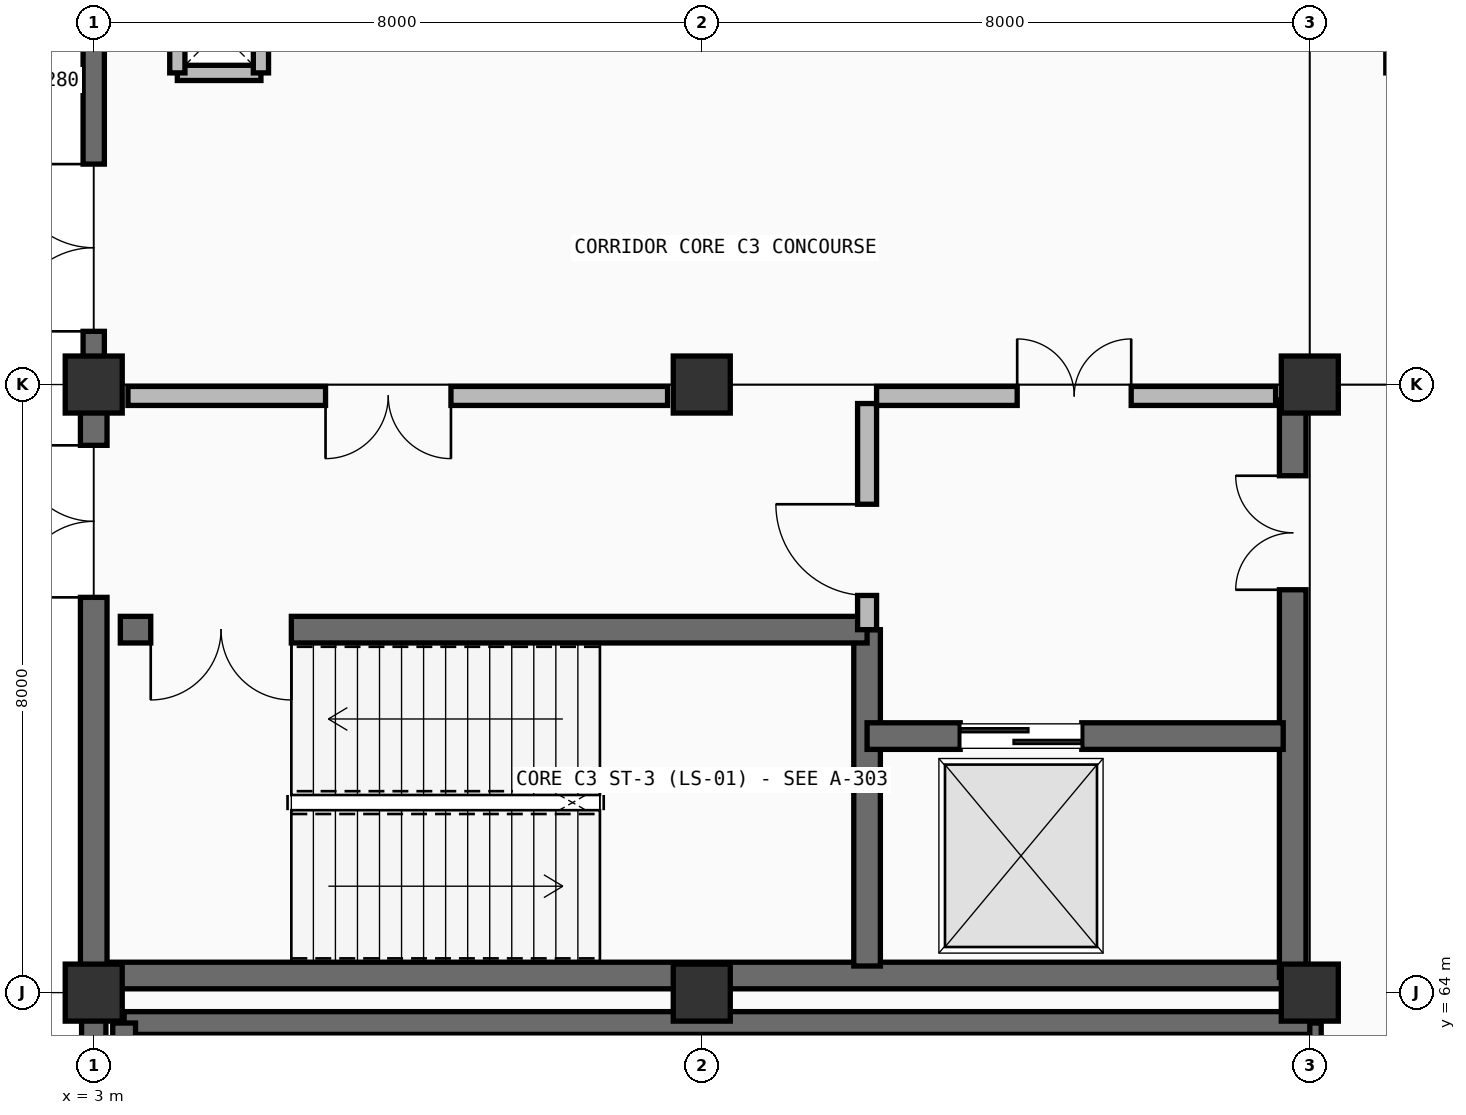
"""IFC4 building model, lengths in metres.
Left out: names, types, materials, properties, quantities, classifications, styles, units other than length and angle.
Written with IfcOpenShell. Run it as: python <this file> out.ifc"""

import sys

from ifc_helpers import new_model, si_unit, direction, frame, frame_2d, origin, origin_2d, place, context, subcontext, project, spatial, rectangle, extrude, element, fill, save


model = new_model("IFC4")
c1 = context("Model", 3, precision=1e-05, world=origin(), true_north=direction((0.0, 1.0)))
c2 = subcontext(c1, "Body", "Model", "MODEL_VIEW")
j1 = project(units=[si_unit("LENGTHUNIT", "METRE"), si_unit("PLANEANGLEUNIT", "RADIAN")], contexts=[c1])
p1 = place(None, origin())
s1 = spatial("IfcSite", under=j1, at=p1, CompositionType="ELEMENT")
p2 = place(p1, origin())
s2 = spatial("IfcBuilding", under=s1, at=p2, CompositionType="ELEMENT")
p3 = place(p2, origin())
s3 = spatial("IfcBuildingStorey", under=s2, at=p3, CompositionType="ELEMENT", Elevation=0.0)
for number, where, z_axis, x_axis in (
    (1, (3.0, 64.0, 0.0), (0.0, 0.0, 1.0), (1.0, 0.0, 0.0)),
    (2, (3.0, 72.0, 0.0), (0.0, 0.0, 1.0), (1.0, 0.0, 0.0)),
    (3, (11.0, 64.0, 0.0), (0.0, 0.0, 1.0), (1.0, 0.0, 0.0)),
    (4, (11.0, 72.0, 0.0), (0.0, 0.0, 1.0), (1.0, 0.0, 0.0)),
    (5, (19.0, 64.0, 0.0), (0.0, 0.0, 1.0), (1.0, 0.0, 0.0)),
    (6, (19.0, 72.0, 0.0), (0.0, 0.0, 1.0), (1.0, 0.0, 0.0)),
):
    element("IfcColumn", number, at=place(p3, frame(where, z_axis=z_axis, x_axis=x_axis)), inside=s3, PredefinedType="COLUMN", context=c2, shape_type="SweptSolid", body=[
        extrude(rectangle(XDim=0.75, YDim=0.75, at=origin_2d()), origin(), (0.0, 0.0, 1.0), 5.4),
    ])
p4 = place(p3, frame((3.0, 59.0, 0.0), z_axis=(0.0, 0.0, 1.0), x_axis=(0.0, 1.0, 0.0)))
e7 = element("IfcWall", 7, at=p4, inside=s3, PredefinedType="SOLIDWALL", context=c2, shape_type="SweptSolid", body=[
    extrude(rectangle(XDim=5.0, YDim=0.32, at=frame_2d((2.5, 0.0))), origin(), (0.0, 0.0, 1.0), 5.4),
])
p5 = place(p3, frame((3.0, 64.0, 0.0), z_axis=(0.0, 0.0, 1.0), x_axis=(0.0, 1.0, 0.0)))
e8 = element("IfcWall", 8, at=p5, inside=s3, PredefinedType="SHEAR", context=c2, shape_type="SweptSolid", body=[
    extrude(rectangle(XDim=8.0, YDim=0.35, at=frame_2d((4.0, 0.0))), origin(), (0.0, 0.0, 1.0), 5.4),
])
p6 = place(p5, frame((5.2, 0.0, 0.0)))
e9 = element("IfcOpeningElement", 9, at=p6, cuts=e8, PredefinedType="OPENING", context=c2, shape_type="SweptSolid", body=[
    extrude(rectangle(XDim=2.0, YDim=2.6, at=frame_2d((1.0, 1.3))), frame((0.0, 0.185, 0.0), z_axis=(0.0, -1.0, 0.0), x_axis=(1.0, 0.0, 0.0)), (0.0, 0.0, 1.0), 0.37),
])
p7 = place(p3, frame((3.0, 72.0, 0.0), z_axis=(0.0, 0.0, 1.0), x_axis=(0.0, 1.0, 0.0)))
e10 = element("IfcWall", 10, at=p7, inside=s3, PredefinedType="SOLIDWALL", context=c2, shape_type="SweptSolid", body=[
    extrude(rectangle(XDim=8.0, YDim=0.28, at=frame_2d((4.0, 0.0))), origin(), (0.0, 0.0, 1.0), 5.4),
])
p8 = place(p7, frame((0.7, 0.0, 0.0)))
e11 = element("IfcOpeningElement", 11, at=p8, cuts=e10, PredefinedType="OPENING", context=c2, shape_type="SweptSolid", body=[
    extrude(rectangle(XDim=2.2, YDim=2.8, at=frame_2d((1.1, 1.4))), frame((0.0, 0.15, 0.0), z_axis=(0.0, -1.0, 0.0), x_axis=(1.0, 0.0, 0.0)), (0.0, 0.0, 1.0), 0.3),
])
p9 = place(p3, frame((3.2, 64.225, 0.0), z_axis=(0.0, 0.0, 1.0), x_axis=(1.0, 0.0, 0.0)))
e12 = element("IfcWall", 12, at=p9, inside=s3, PredefinedType="SHEAR", context=c2, shape_type="SweptSolid", body=[
    extrude(rectangle(XDim=15.6, YDim=0.35, at=frame_2d((7.8, 0.0))), origin(), (0.0, 0.0, 1.0), 5.1),
])
p10 = place(p3, frame((13.175, 64.35, 0.0), z_axis=(0.0, 0.0, 1.0), x_axis=(0.0, 1.0, 0.0)))
e13 = element("IfcWall", 13, at=p10, inside=s3, PredefinedType="SHEAR", context=c2, shape_type="SweptSolid", body=[
    extrude(rectangle(XDim=4.425, YDim=0.35, at=frame_2d((2.212, 0.0))), origin(), (0.0, 0.0, 1.0), 5.1),
])
p11 = place(p3, frame((18.775, 64.2, 0.0), z_axis=(0.0, 0.0, 1.0), x_axis=(0.0, 1.0, 0.0)))
e14 = element("IfcWall", 14, at=p11, inside=s3, PredefinedType="SHEAR", context=c2, shape_type="SweptSolid", body=[
    extrude(rectangle(XDim=7.6, YDim=0.35, at=frame_2d((3.8, 0.0))), origin(), (0.0, 0.0, 1.0), 5.1),
])
p12 = place(p11, frame((5.1, 0.0, 0.0)))
e15 = element("IfcOpeningElement", 15, at=p12, cuts=e14, PredefinedType="OPENING", context=c2, shape_type="SweptSolid", body=[
    extrude(rectangle(XDim=1.5, YDim=2.2, at=frame_2d((0.75, 1.1))), frame((0.0, 0.185, 0.0), z_axis=(0.0, -1.0, 0.0), x_axis=(1.0, 0.0, 0.0)), (0.0, 0.0, 1.0), 0.37),
])
p13 = place(p3, frame((3.35, 68.775, 0.0), z_axis=(0.0, 0.0, 1.0), x_axis=(1.0, 0.0, 0.0)))
e16 = element("IfcWall", 16, at=p13, inside=s3, PredefinedType="SHEAR", context=c2, shape_type="SweptSolid", body=[
    extrude(rectangle(XDim=9.825, YDim=0.35, at=frame_2d((4.913, 0.0))), origin(), (0.0, 0.0, 1.0), 5.1),
])
p14 = place(p13, frame((0.4, 0.0, 0.0)))
e17 = element("IfcOpeningElement", 17, at=p14, cuts=e16, PredefinedType="OPENING", context=c2, shape_type="SweptSolid", body=[
    extrude(rectangle(XDim=1.85, YDim=2.25, at=frame_2d((0.925, 1.125))), frame((0.0, 0.185, 0.0), z_axis=(0.0, -1.0, 0.0), x_axis=(1.0, 0.0, 0.0)), (0.0, 0.0, 1.0), 0.37),
])
p15 = place(p3, frame((13.175, 67.375, 0.0), z_axis=(0.0, 0.0, 1.0), x_axis=(1.0, 0.0, 0.0)))
e18 = element("IfcWall", 18, at=p15, inside=s3, PredefinedType="SHEAR", context=c2, shape_type="SweptSolid", body=[
    extrude(rectangle(XDim=5.475, YDim=0.35, at=frame_2d((2.737, 0.0))), origin(), (0.0, 0.0, 1.0), 5.1),
])
p16 = place(p15, frame((1.225, 0.0, 0.0)))
e19 = element("IfcOpeningElement", 19, at=p16, cuts=e18, PredefinedType="OPENING", context=c2, shape_type="SweptSolid", body=[
    extrude(rectangle(XDim=1.6, YDim=2.4, at=frame_2d((0.8, 1.2))), frame((0.0, 0.185, 0.0), z_axis=(0.0, -1.0, 0.0), x_axis=(1.0, 0.0, 0.0)), (0.0, 0.0, 1.0), 0.37),
])
p17 = place(p3, frame((13.175, 68.775, 0.0), z_axis=(0.0, 0.0, 1.0), x_axis=(0.0, 1.0, 0.0)))
e20 = element("IfcWall", 20, at=p17, inside=s3, PredefinedType="PARTITIONING", context=c2, shape_type="SweptSolid", body=[
    extrude(rectangle(XDim=2.975, YDim=0.25, at=frame_2d((1.488, 0.0))), origin(), (0.0, 0.0, 1.0), 5.1),
])
p18 = place(p17, frame((0.45, 0.0, 0.0)))
e21 = element("IfcOpeningElement", 21, at=p18, cuts=e20, PredefinedType="OPENING", context=c2, shape_type="SweptSolid", body=[
    extrude(rectangle(XDim=1.2, YDim=2.2, at=frame_2d((0.6, 1.1))), frame((0.0, 0.135, 0.0), z_axis=(0.0, -1.0, 0.0), x_axis=(1.0, 0.0, 0.0)), (0.0, 0.0, 1.0), 0.27),
])
p19 = place(p3, frame((3.45, 71.85, 0.0), z_axis=(0.0, 0.0, 1.0), x_axis=(1.0, 0.0, 0.0)))
e22 = element("IfcWall", 22, at=p19, inside=s3, PredefinedType="PARTITIONING", context=c2, shape_type="SweptSolid", body=[
    extrude(rectangle(XDim=7.1, YDim=0.25, at=frame_2d((3.55, 0.0))), origin(), (0.0, 0.0, 1.0), 4.335),
])
p20 = place(p19, frame((2.6, 0.0, 0.0)))
e23 = element("IfcOpeningElement", 23, at=p20, cuts=e22, PredefinedType="OPENING", context=c2, shape_type="SweptSolid", body=[
    extrude(rectangle(XDim=1.65, YDim=2.25, at=frame_2d((0.825, 1.125))), frame((0.0, 0.135, 0.0), z_axis=(0.0, -1.0, 0.0), x_axis=(1.0, 0.0, 0.0)), (0.0, 0.0, 1.0), 0.27),
])
p21 = place(p3, frame((13.3, 71.85, 0.0), z_axis=(0.0, 0.0, 1.0), x_axis=(1.0, 0.0, 0.0)))
e24 = element("IfcWall", 24, at=p21, inside=s3, PredefinedType="PARTITIONING", context=c2, shape_type="SweptSolid", body=[
    extrude(rectangle(XDim=5.25, YDim=0.25, at=frame_2d((2.625, 0.0))), origin(), (0.0, 0.0, 1.0), 4.335),
])
p22 = place(p21, frame((1.85, 0.0, 0.0)))
e25 = element("IfcOpeningElement", 25, at=p22, cuts=e24, PredefinedType="OPENING", context=c2, shape_type="SweptSolid", body=[
    extrude(rectangle(XDim=1.5, YDim=2.2, at=frame_2d((0.75, 1.1))), frame((0.0, 0.135, 0.0), z_axis=(0.0, -1.0, 0.0), x_axis=(1.0, 0.0, 0.0)), (0.0, 0.0, 1.0), 0.27),
])
p23 = place(p3, frame((19.0, 38.6, 0.0), z_axis=(0.0, 0.0, 1.0), x_axis=(0.0, 1.0, 0.0)))
e26 = element("IfcWall", 26, at=p23, inside=s3, PredefinedType="SHEAR", context=c2, shape_type="SweptSolid", body=[
    extrude(rectangle(XDim=25.0, YDim=0.3, at=frame_2d((12.5, 0.0))), origin(), (0.0, 0.0, 1.0), 5.1),
])
p24 = place(p23, frame((15.709, 0.0, 0.0)))
e27 = element("IfcOpeningElement", 27, at=p24, cuts=e26, PredefinedType="OPENING", context=c2, shape_type="SweptSolid", body=[
    extrude(rectangle(XDim=1.4, YDim=2.22, at=frame_2d((0.7, 1.11))), frame((0.0, 0.16, 0.0), z_axis=(0.0, -1.0, 0.0), x_axis=(1.0, 0.0, 0.0)), (0.0, 0.0, 1.0), 0.32),
])
p25 = place(p3, frame((3.4, 63.6, 0.0), z_axis=(0.0, 0.0, 1.0), x_axis=(1.0, 0.0, 0.0)))
e28 = element("IfcWall", 28, at=p25, inside=s3, PredefinedType="SHEAR", context=c2, shape_type="SweptSolid", body=[
    extrude(rectangle(XDim=15.6, YDim=0.3, at=frame_2d((7.8, 0.0))), origin(), (0.0, 0.0, 1.0), 5.1),
])
p26 = place(p3, frame((3.4, 38.6, 0.0), z_axis=(0.0, 0.0, 1.0), x_axis=(0.0, 1.0, 0.0)))
e29 = element("IfcWall", 29, at=p26, inside=s3, PredefinedType="SHEAR", context=c2, shape_type="SweptSolid", body=[
    extrude(rectangle(XDim=25.0, YDim=0.3, at=frame_2d((12.5, 0.0))), origin(), (0.0, 0.0, 1.0), 5.1),
])
for number, where, z_axis, x_axis in (
    (30, (4.1, 76.1, 0.0), (0.0, 0.0, 1.0), (1.0, 0.0, 0.0)),
    (31, (4.1, 76.1, 0.0), (0.0, 0.0, 1.0), (0.0, 1.0, 0.0)),
    (32, (5.2, 76.1, 0.0), (0.0, 0.0, 1.0), (0.0, 1.0, 0.0)),
):
    element("IfcWall", number, at=place(p3, frame(where, z_axis=z_axis, x_axis=x_axis)), inside=s3, PredefinedType="PARTITIONING", context=c2, shape_type="SweptSolid", body=[
        extrude(rectangle(XDim=1.1, YDim=0.2, at=frame_2d((0.55, 0.0))), origin(), (0.0, 0.0, 1.0), 5.1),
    ])
p27 = place(p6, origin())
e33 = element("IfcDoor", 33, at=p27, inside=s3, OperationType="DOUBLE_DOOR_SINGLE_SWING", PredefinedType="DOOR", context=c2, shape_type="SweptSolid", body=[
    extrude(rectangle(XDim=2.0, YDim=2.6, at=frame_2d((1.0, 1.3))), frame((0.0, 0.025, 0.0), z_axis=(0.0, -1.0, 0.0), x_axis=(1.0, 0.0, 0.0)), (0.0, 0.0, 1.0), 0.05),
])
fill(e9, e33)
p28 = place(p8, origin())
e34 = element("IfcDoor", 34, at=p28, inside=s3, OperationType="DOUBLE_DOOR_SINGLE_SWING", PredefinedType="DOOR", context=c2, shape_type="SweptSolid", body=[
    extrude(rectangle(XDim=2.2, YDim=2.8, at=frame_2d((1.1, 1.4))), frame((0.0, 0.025, 0.0), z_axis=(0.0, -1.0, 0.0), x_axis=(1.0, 0.0, 0.0)), (0.0, 0.0, 1.0), 0.05),
])
fill(e11, e34)
p29 = place(p14, frame((1.85, 0.0, 0.0), z_axis=(0.0, 0.0, 1.0), x_axis=(-1.0, 0.0, 0.0)))
e35 = element("IfcDoor", 35, at=p29, inside=s3, OperationType="DOUBLE_DOOR_SINGLE_SWING", PredefinedType="DOOR", context=c2, shape_type="SweptSolid", body=[
    extrude(rectangle(XDim=1.85, YDim=2.25, at=frame_2d((0.925, 1.125))), frame((0.0, 0.025, 0.0), z_axis=(0.0, -1.0, 0.0), x_axis=(1.0, 0.0, 0.0)), (0.0, 0.0, 1.0), 0.05),
])
fill(e17, e35)
p30 = place(p16, origin())
e36 = element("IfcDoor", 36, at=p30, inside=s3, OperationType="DOUBLE_DOOR_SLIDING", PredefinedType="DOOR", context=c2, shape_type="SweptSolid", body=[
    extrude(rectangle(XDim=1.6, YDim=2.4, at=frame_2d((0.8, 1.2))), frame((0.0, 0.025, 0.0), z_axis=(0.0, -1.0, 0.0), x_axis=(1.0, 0.0, 0.0)), (0.0, 0.0, 1.0), 0.05),
])
fill(e19, e36)
p31 = place(p18, origin())
e37 = element("IfcDoor", 37, at=p31, inside=s3, OperationType="SINGLE_SWING_RIGHT", PredefinedType="DOOR", context=c2, shape_type="SweptSolid", body=[
    extrude(rectangle(XDim=1.2, YDim=2.2, at=frame_2d((0.6, 1.1))), frame((0.0, 0.025, 0.0), z_axis=(0.0, -1.0, 0.0), x_axis=(1.0, 0.0, 0.0)), (0.0, 0.0, 1.0), 0.05),
])
fill(e21, e37)
p32 = place(p20, frame((1.65, 0.0, 0.0), z_axis=(0.0, 0.0, 1.0), x_axis=(-1.0, 0.0, 0.0)))
e38 = element("IfcDoor", 38, at=p32, inside=s3, OperationType="DOUBLE_DOOR_SINGLE_SWING", PredefinedType="DOOR", context=c2, shape_type="SweptSolid", body=[
    extrude(rectangle(XDim=1.65, YDim=2.25, at=frame_2d((0.825, 1.125))), frame((0.0, 0.025, 0.0), z_axis=(0.0, -1.0, 0.0), x_axis=(1.0, 0.0, 0.0)), (0.0, 0.0, 1.0), 0.05),
])
fill(e23, e38)
p33 = place(p22, origin())
e39 = element("IfcDoor", 39, at=p33, inside=s3, OperationType="DOUBLE_DOOR_SINGLE_SWING", PredefinedType="DOOR", context=c2, shape_type="SweptSolid", body=[
    extrude(rectangle(XDim=1.5, YDim=2.2, at=frame_2d((0.75, 1.1))), frame((0.0, 0.025, 0.0), z_axis=(0.0, -1.0, 0.0), x_axis=(1.0, 0.0, 0.0)), (0.0, 0.0, 1.0), 0.05),
])
fill(e25, e39)
p34 = place(p12, origin())
e40 = element("IfcDoor", 40, at=p34, inside=s3, OperationType="DOUBLE_DOOR_SINGLE_SWING", PredefinedType="DOOR", context=c2, shape_type="SweptSolid", body=[
    extrude(rectangle(XDim=1.5, YDim=2.2, at=frame_2d((0.75, 1.1))), frame((0.0, 0.025, 0.0), z_axis=(0.0, -1.0, 0.0), x_axis=(1.0, 0.0, 0.0)), (0.0, 0.0, 1.0), 0.05),
])
fill(e15, e40)
save(model, sys.argv[1])
